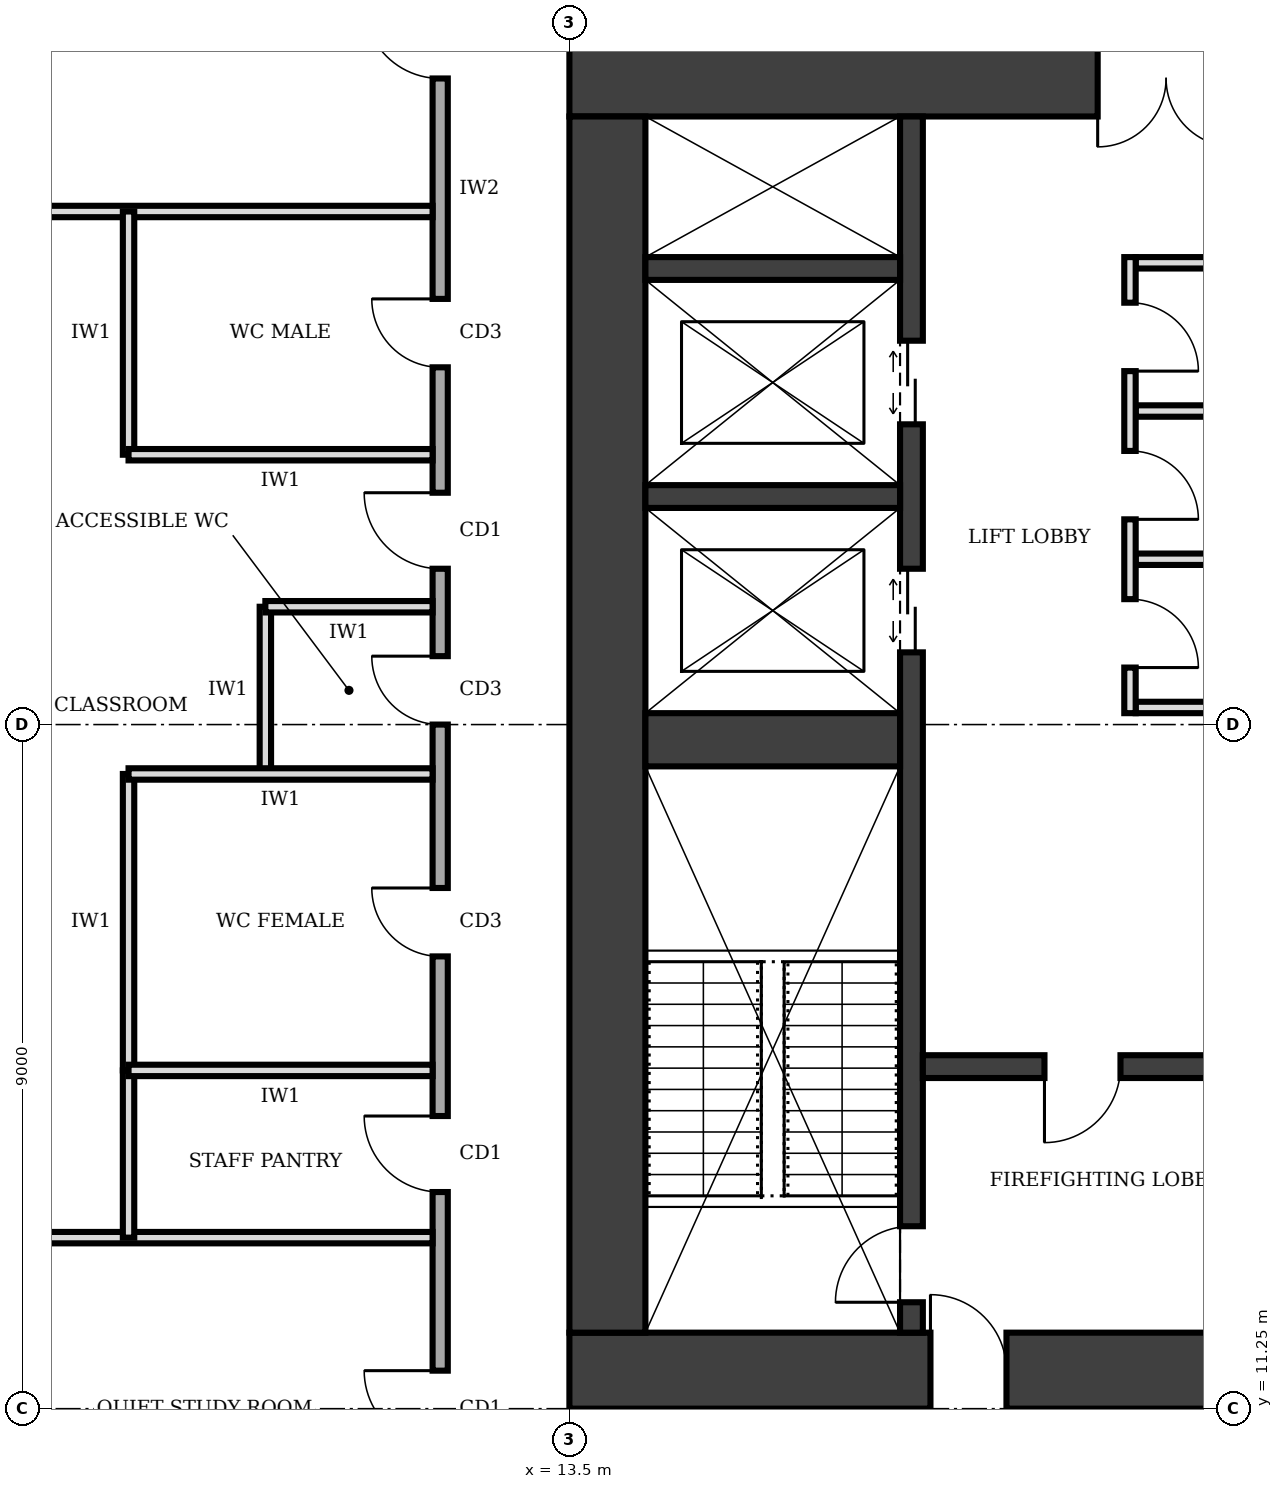
"""IFC4 building model, lengths in metres.
Left out: names, types, materials, properties, quantities, classifications, styles, units other than length and angle.
Written with IfcOpenShell. Run it as: python <this file> out.ifc"""

import sys

from ifc_helpers import new_model, si_unit, direction, frame, frame_2d, origin, place, context, subcontext, project, spatial, rectangle, extrude, element, fill, save


model = new_model("IFC4")
c1 = context("Model", 3, precision=1e-05, world=origin(), true_north=direction((0.0, 1.0)))
c2 = subcontext(c1, "Body", "Model", "MODEL_VIEW")
j1 = project(units=[si_unit("LENGTHUNIT", "METRE"), si_unit("PLANEANGLEUNIT", "RADIAN")], contexts=[c1])
p1 = place(None, origin())
s1 = spatial("IfcSite", under=j1, at=p1, CompositionType="ELEMENT")
p2 = place(p1, origin())
s2 = spatial("IfcBuilding", under=s1, at=p2, CompositionType="ELEMENT")
p3 = place(p2, frame((0.0, 0.0, 61.0)))
s3 = spatial("IfcBuildingStorey", under=s2, at=p3, CompositionType="ELEMENT", Elevation=61.0)
p4 = place(p3, frame((13.5, 11.75, 0.0), z_axis=(0.0, 0.0, 1.0), x_axis=(1.0, 0.0, 0.0)))
e1 = element("IfcWall", 1, at=p4, inside=s3, PredefinedType="SHEAR", context=c2, shape_type="SweptSolid", body=[
    extrude(rectangle(XDim=13.5, YDim=1.0, at=frame_2d((6.75, 0.0))), origin(), (0.0, 0.0, 1.0), 4.0),
])
p5 = place(p4, frame((4.75, 0.0, 0.0)))
e2 = element("IfcOpeningElement", 2, at=p5, cuts=e1, PredefinedType="OPENING", context=c2, shape_type="SweptSolid", body=[
    extrude(rectangle(XDim=1.0, YDim=2.1, at=frame_2d((0.5, 1.05))), frame((0.0, 0.51, 0.0), z_axis=(0.0, -1.0, 0.0), x_axis=(1.0, 0.0, 0.0)), (0.0, 0.0, 1.0), 1.02),
])
p6 = place(p3, frame((27.0, 28.75, 0.0), z_axis=(0.0, 0.0, 1.0), x_axis=(-1.0, 0.0, 0.0)))
e3 = element("IfcWall", 3, at=p6, inside=s3, PredefinedType="SHEAR", context=c2, shape_type="SweptSolid", body=[
    extrude(rectangle(XDim=13.5, YDim=1.0, at=frame_2d((6.75, 0.0))), origin(), (0.0, 0.0, 1.0), 4.0),
])
p7 = place(p6, frame((4.75, 0.0, 0.0)))
e4 = element("IfcOpeningElement", 4, at=p7, cuts=e3, PredefinedType="OPENING", context=c2, shape_type="SweptSolid", body=[
    extrude(rectangle(XDim=1.8, YDim=2.1, at=frame_2d((0.9, 1.05))), frame((0.0, 0.51, 0.0), z_axis=(0.0, -1.0, 0.0), x_axis=(1.0, 0.0, 0.0)), (0.0, 0.0, 1.0), 1.02),
])
p8 = place(p3, frame((14.0, 28.25, 0.0), z_axis=(0.0, 0.0, 1.0), x_axis=(0.0, -1.0, 0.0)))
e5 = element("IfcWall", 5, at=p8, inside=s3, PredefinedType="SHEAR", context=c2, shape_type="SweptSolid", body=[
    extrude(rectangle(XDim=16.0, YDim=1.0, at=frame_2d((8.0, 0.0))), origin(), (0.0, 0.0, 1.0), 4.0),
])
p9 = place(p3, frame((18.0, 12.25, 0.0), z_axis=(0.0, 0.0, 1.0), x_axis=(0.0, 1.0, 0.0)))
e6 = element("IfcWall", 6, at=p9, inside=s3, PredefinedType="SHEAR", context=c2, shape_type="SweptSolid", body=[
    extrude(rectangle(XDim=16.0, YDim=0.3, at=frame_2d((8.0, 0.0))), origin(), (0.0, 0.0, 1.0), 4.0),
])
p10 = place(p9, frame((0.4, 0.0, 0.0)))
e7 = element("IfcOpeningElement", 7, at=p10, cuts=e6, PredefinedType="OPENING", context=c2, shape_type="SweptSolid", body=[
    extrude(rectangle(XDim=1.0, YDim=2.1, at=frame_2d((0.5, 1.05))), frame((0.0, 0.16, 0.0), z_axis=(0.0, -1.0, 0.0), x_axis=(1.0, 0.0, 0.0)), (0.0, 0.0, 1.0), 0.32),
])
p11 = place(p9, frame((8.95, 0.0, 0.0)))
e8 = element("IfcOpeningElement", 8, at=p11, cuts=e6, PredefinedType="OPENING", context=c2, shape_type="SweptSolid", body=[
    extrude(rectangle(XDim=1.1, YDim=2.1, at=frame_2d((0.55, 1.05))), frame((0.0, 0.16, 0.0), z_axis=(0.0, -1.0, 0.0), x_axis=(1.0, 0.0, 0.0)), (0.0, 0.0, 1.0), 0.32),
])
p12 = place(p9, frame((11.95, 0.0, 0.0)))
e9 = element("IfcOpeningElement", 9, at=p12, cuts=e6, PredefinedType="OPENING", context=c2, shape_type="SweptSolid", body=[
    extrude(rectangle(XDim=1.1, YDim=2.1, at=frame_2d((0.55, 1.05))), frame((0.0, 0.16, 0.0), z_axis=(0.0, -1.0, 0.0), x_axis=(1.0, 0.0, 0.0)), (0.0, 0.0, 1.0), 0.32),
])
p13 = place(p3, frame((14.5, 20.05, 0.0), z_axis=(0.0, 0.0, 1.0), x_axis=(1.0, 0.0, 0.0)))
e10 = element("IfcWall", 10, at=p13, inside=s3, PredefinedType="SHEAR", context=c2, shape_type="SweptSolid", body=[
    extrude(rectangle(XDim=3.35, YDim=0.7, at=frame_2d((1.675, 0.0))), origin(), (0.0, 0.0, 1.0), 4.0),
])
p14 = place(p3, frame((18.15, 15.75, 0.0), z_axis=(0.0, 0.0, 1.0), x_axis=(1.0, 0.0, 0.0)))
e11 = element("IfcWall", 11, at=p14, inside=s3, PredefinedType="SHEAR", context=c2, shape_type="SweptSolid", body=[
    extrude(rectangle(XDim=4.2, YDim=0.3, at=frame_2d((2.1, 0.0))), origin(), (0.0, 0.0, 1.0), 4.0),
])
p15 = place(p14, frame((1.6, 0.0, 0.0)))
e12 = element("IfcOpeningElement", 12, at=p15, cuts=e11, PredefinedType="OPENING", context=c2, shape_type="SweptSolid", body=[
    extrude(rectangle(XDim=1.0, YDim=2.1, at=frame_2d((0.5, 1.05))), frame((0.0, 0.16, 0.0), z_axis=(0.0, -1.0, 0.0), x_axis=(1.0, 0.0, 0.0)), (0.0, 0.0, 1.0), 0.32),
])
for number, where, z_axis, x_axis in (
    (13, (14.5, 23.25, 0.0), (0.0, 0.0, 1.0), (1.0, 0.0, 0.0)),
    (14, (14.5, 26.25, 0.0), (0.0, 0.0, 1.0), (1.0, 0.0, 0.0)),
):
    element("IfcWall", number, at=place(p3, frame(where, z_axis=z_axis, x_axis=x_axis)), inside=s3, PredefinedType="SHEAR", context=c2, shape_type="SweptSolid", body=[
        extrude(rectangle(XDim=3.35, YDim=0.3, at=frame_2d((1.675, 0.0))), origin(), (0.0, 0.0, 1.0), 4.0),
    ])
p16 = place(p3, frame((20.875, 20.4, 0.0), z_axis=(0.0, 0.0, 1.0), x_axis=(0.0, 1.0, 0.0)))
e15 = element("IfcWall", 15, at=p16, inside=s3, PredefinedType="PARTITIONING", context=c2, shape_type="SweptSolid", body=[
    extrude(rectangle(XDim=6.0, YDim=0.15, at=frame_2d((3.0, 0.0))), origin(), (0.0, 0.0, 1.0), 3.75),
])
p17 = place(p16, frame((0.6, 0.0, 0.0)))
e16 = element("IfcOpeningElement", 16, at=p17, cuts=e15, PredefinedType="OPENING", context=c2, shape_type="SweptSolid", body=[
    extrude(rectangle(XDim=0.9, YDim=2.1, at=frame_2d((0.45, 1.05))), frame((0.0, 0.085, 0.0), z_axis=(0.0, -1.0, 0.0), x_axis=(1.0, 0.0, 0.0)), (0.0, 0.0, 1.0), 0.17),
])
p18 = place(p16, frame((2.55, 0.0, 0.0)))
e17 = element("IfcOpeningElement", 17, at=p18, cuts=e15, PredefinedType="OPENING", context=c2, shape_type="SweptSolid", body=[
    extrude(rectangle(XDim=0.9, YDim=2.1, at=frame_2d((0.45, 1.05))), frame((0.0, 0.085, 0.0), z_axis=(0.0, -1.0, 0.0), x_axis=(1.0, 0.0, 0.0)), (0.0, 0.0, 1.0), 0.17),
])
p19 = place(p16, frame((4.5, 0.0, 0.0)))
e18 = element("IfcOpeningElement", 18, at=p19, cuts=e15, PredefinedType="OPENING", context=c2, shape_type="SweptSolid", body=[
    extrude(rectangle(XDim=0.9, YDim=2.1, at=frame_2d((0.45, 1.05))), frame((0.0, 0.085, 0.0), z_axis=(0.0, -1.0, 0.0), x_axis=(1.0, 0.0, 0.0)), (0.0, 0.0, 1.0), 0.17),
])
for number, where, z_axis, x_axis in (
    (19, (20.95, 20.475, 0.0), (0.0, 0.0, 1.0), (1.0, 0.0, 0.0)),
    (20, (20.95, 22.425, 0.0), (0.0, 0.0, 1.0), (1.0, 0.0, 0.0)),
    (21, (20.95, 24.375, 0.0), (0.0, 0.0, 1.0), (1.0, 0.0, 0.0)),
    (22, (20.95, 26.325, 0.0), (0.0, 0.0, 1.0), (1.0, 0.0, 0.0)),
):
    element("IfcWall", number, at=place(p3, frame(where, z_axis=z_axis, x_axis=x_axis)), inside=s3, PredefinedType="PARTITIONING", context=c2, shape_type="SweptSolid", body=[
        extrude(rectangle(XDim=1.4, YDim=0.15, at=frame_2d((0.7, 0.0))), origin(), (0.0, 0.0, 1.0), 3.75),
    ])
p20 = place(p3, frame((11.8, 31.3, 0.0), z_axis=(0.0, 0.0, 1.0), x_axis=(0.0, -1.0, 0.0)))
e23 = element("IfcWall", 23, at=p20, inside=s3, PredefinedType="SOLIDWALL", context=c2, shape_type="SweptSolid", body=[
    extrude(rectangle(XDim=22.3, YDim=0.2, at=frame_2d((11.15, 0.0))), origin(), (0.0, 0.0, 1.0), 3.75),
])
p21 = place(p20, frame((19.55, 0.0, 0.0)))
e24 = element("IfcOpeningElement", 24, at=p21, cuts=e23, PredefinedType="OPENING", context=c2, shape_type="SweptSolid", body=[
    extrude(rectangle(XDim=1.0, YDim=2.1, at=frame_2d((0.5, 1.05))), frame((0.0, 0.11, 0.0), z_axis=(0.0, -1.0, 0.0), x_axis=(1.0, 0.0, 0.0)), (0.0, 0.0, 1.0), 0.22),
])
p22 = place(p20, frame((16.2, 0.0, 0.0)))
e25 = element("IfcOpeningElement", 25, at=p22, cuts=e23, PredefinedType="OPENING", context=c2, shape_type="SweptSolid", body=[
    extrude(rectangle(XDim=1.0, YDim=2.1, at=frame_2d((0.5, 1.05))), frame((0.0, 0.11, 0.0), z_axis=(0.0, -1.0, 0.0), x_axis=(1.0, 0.0, 0.0)), (0.0, 0.0, 1.0), 0.22),
])
p23 = place(p20, frame((13.2, 0.0, 0.0)))
e26 = element("IfcOpeningElement", 26, at=p23, cuts=e23, PredefinedType="OPENING", context=c2, shape_type="SweptSolid", body=[
    extrude(rectangle(XDim=0.9, YDim=2.1, at=frame_2d((0.45, 1.05))), frame((0.0, 0.11, 0.0), z_axis=(0.0, -1.0, 0.0), x_axis=(1.0, 0.0, 0.0)), (0.0, 0.0, 1.0), 0.22),
])
p24 = place(p20, frame((10.15, 0.0, 0.0)))
e27 = element("IfcOpeningElement", 27, at=p24, cuts=e23, PredefinedType="OPENING", context=c2, shape_type="SweptSolid", body=[
    extrude(rectangle(XDim=0.9, YDim=2.1, at=frame_2d((0.45, 1.05))), frame((0.0, 0.11, 0.0), z_axis=(0.0, -1.0, 0.0), x_axis=(1.0, 0.0, 0.0)), (0.0, 0.0, 1.0), 0.22),
])
p25 = place(p20, frame((5.45, 0.0, 0.0)))
e28 = element("IfcOpeningElement", 28, at=p25, cuts=e23, PredefinedType="OPENING", context=c2, shape_type="SweptSolid", body=[
    extrude(rectangle(XDim=0.9, YDim=2.1, at=frame_2d((0.45, 1.05))), frame((0.0, 0.11, 0.0), z_axis=(0.0, -1.0, 0.0), x_axis=(1.0, 0.0, 0.0)), (0.0, 0.0, 1.0), 0.22),
])
p26 = place(p20, frame((8.0, 0.0, 0.0)))
e29 = element("IfcOpeningElement", 29, at=p26, cuts=e23, PredefinedType="OPENING", context=c2, shape_type="SweptSolid", body=[
    extrude(rectangle(XDim=1.0, YDim=2.1, at=frame_2d((0.5, 1.05))), frame((0.0, 0.11, 0.0), z_axis=(0.0, -1.0, 0.0), x_axis=(1.0, 0.0, 0.0)), (0.0, 0.0, 1.0), 0.22),
])
p27 = place(p20, frame((1.55, 0.0, 0.0)))
e30 = element("IfcOpeningElement", 30, at=p27, cuts=e23, PredefinedType="OPENING", context=c2, shape_type="SweptSolid", body=[
    extrude(rectangle(XDim=1.0, YDim=2.1, at=frame_2d((0.5, 1.05))), frame((0.0, 0.11, 0.0), z_axis=(0.0, -1.0, 0.0), x_axis=(1.0, 0.0, 0.0)), (0.0, 0.0, 1.0), 0.22),
])
for number, where, z_axis, x_axis in (
    (31, (0.3, 13.5, 0.0), (0.0, 0.0, 1.0), (1.0, 0.0, 0.0)),
    (32, (0.3, 27.0, 0.0), (0.0, 0.0, 1.0), (1.0, 0.0, 0.0)),
):
    element("IfcWall", number, at=place(p3, frame(where, z_axis=z_axis, x_axis=x_axis)), inside=s3, PredefinedType="PARTITIONING", context=c2, shape_type="SweptSolid", body=[
        extrude(rectangle(XDim=11.4, YDim=0.15, at=frame_2d((5.7, 0.0))), origin(), (0.0, 0.0, 1.0), 3.75),
    ])
p28 = place(p3, frame((11.7, 15.7, 0.0), z_axis=(0.0, 0.0, 1.0), x_axis=(-1.0, 0.0, 0.0)))
e33 = element("IfcWall", 33, at=p28, inside=s3, PredefinedType="PARTITIONING", context=c2, shape_type="SweptSolid", body=[
    extrude(rectangle(XDim=4.0, YDim=0.15, at=frame_2d((2.0, 0.0))), origin(), (0.0, 0.0, 1.0), 3.75),
])
p29 = place(p3, frame((11.7, 19.6, 0.0), z_axis=(0.0, 0.0, 1.0), x_axis=(-1.0, 0.0, 0.0)))
e34 = element("IfcWall", 34, at=p29, inside=s3, PredefinedType="PARTITIONING", context=c2, shape_type="SweptSolid", body=[
    extrude(rectangle(XDim=4.0, YDim=0.15, at=frame_2d((2.0, 0.0))), origin(), (0.0, 0.0, 1.0), 2.85),
])
p30 = place(p3, frame((11.7, 21.8, 0.0), z_axis=(0.0, 0.0, 1.0), x_axis=(-1.0, 0.0, 0.0)))
e35 = element("IfcWall", 35, at=p30, inside=s3, PredefinedType="PARTITIONING", context=c2, shape_type="SweptSolid", body=[
    extrude(rectangle(XDim=2.2, YDim=0.15, at=frame_2d((1.1, 0.0))), origin(), (0.0, 0.0, 1.0), 3.75),
])
p31 = place(p3, frame((11.7, 23.8, 0.0), z_axis=(0.0, 0.0, 1.0), x_axis=(-1.0, 0.0, 0.0)))
e36 = element("IfcWall", 36, at=p31, inside=s3, PredefinedType="PARTITIONING", context=c2, shape_type="SweptSolid", body=[
    extrude(rectangle(XDim=4.0, YDim=0.15, at=frame_2d((2.0, 0.0))), origin(), (0.0, 0.0, 1.0), 3.75),
])
p32 = place(p3, frame((7.7, 13.5, 0.0), z_axis=(0.0, 0.0, 1.0), x_axis=(0.0, 1.0, 0.0)))
e37 = element("IfcWall", 37, at=p32, inside=s3, PredefinedType="PARTITIONING", context=c2, shape_type="SweptSolid", body=[
    extrude(rectangle(XDim=2.2, YDim=0.15, at=frame_2d((1.1, 0.0))), origin(), (0.0, 0.0, 1.0), 3.75),
])
p33 = place(p3, frame((7.7, 15.7, 0.0), z_axis=(0.0, 0.0, 1.0), x_axis=(0.0, 1.0, 0.0)))
e38 = element("IfcWall", 38, at=p33, inside=s3, PredefinedType="PARTITIONING", context=c2, shape_type="SweptSolid", body=[
    extrude(rectangle(XDim=3.9, YDim=0.15, at=frame_2d((1.95, 0.0))), origin(), (0.0, 0.0, 1.0), 3.75),
])
p34 = place(p3, frame((9.5, 19.6, 0.0), z_axis=(0.0, 0.0, 1.0), x_axis=(0.0, 1.0, 0.0)))
e39 = element("IfcWall", 39, at=p34, inside=s3, PredefinedType="PARTITIONING", context=c2, shape_type="SweptSolid", body=[
    extrude(rectangle(XDim=2.2, YDim=0.15, at=frame_2d((1.1, 0.0))), origin(), (0.0, 0.0, 1.0), 3.75),
])
p35 = place(p3, frame((7.7, 23.8, 0.0), z_axis=(0.0, 0.0, 1.0), x_axis=(0.0, 1.0, 0.0)))
e40 = element("IfcWall", 40, at=p35, inside=s3, PredefinedType="PARTITIONING", context=c2, shape_type="SweptSolid", body=[
    extrude(rectangle(XDim=3.2, YDim=0.15, at=frame_2d((1.6, 0.0))), origin(), (0.0, 0.0, 1.0), 3.75),
])
p36 = place(p5, origin())
e41 = element("IfcDoor", 41, at=p36, inside=s3, OperationType="SINGLE_SWING_LEFT", PredefinedType="DOOR", context=c2, shape_type="SweptSolid", body=[
    extrude(rectangle(XDim=1.0, YDim=2.1, at=frame_2d((0.5, 1.05))), frame((0.0, 0.025, 0.0), z_axis=(0.0, -1.0, 0.0), x_axis=(1.0, 0.0, 0.0)), (0.0, 0.0, 1.0), 0.05),
])
fill(e2, e41)
p37 = place(p7, origin())
e42 = element("IfcDoor", 42, at=p37, inside=s3, OperationType="DOUBLE_DOOR_SINGLE_SWING", PredefinedType="DOOR", context=c2, shape_type="SweptSolid", body=[
    extrude(rectangle(XDim=1.8, YDim=2.1, at=frame_2d((0.9, 1.05))), frame((0.0, 0.025, 0.0), z_axis=(0.0, -1.0, 0.0), x_axis=(1.0, 0.0, 0.0)), (0.0, 0.0, 1.0), 0.05),
])
fill(e4, e42)
p38 = place(p15, frame((1.0, 0.0, 0.0), z_axis=(0.0, 0.0, 1.0), x_axis=(-1.0, 0.0, 0.0)))
e43 = element("IfcDoor", 43, at=p38, inside=s3, OperationType="SINGLE_SWING_RIGHT", PredefinedType="DOOR", context=c2, shape_type="SweptSolid", body=[
    extrude(rectangle(XDim=1.0, YDim=2.1, at=frame_2d((0.5, 1.05))), frame((0.0, 0.025, 0.0), z_axis=(0.0, -1.0, 0.0), x_axis=(1.0, 0.0, 0.0)), (0.0, 0.0, 1.0), 0.05),
])
fill(e12, e43)
p39 = place(p10, origin())
e44 = element("IfcDoor", 44, at=p39, inside=s3, OperationType="SINGLE_SWING_LEFT", PredefinedType="DOOR", context=c2, shape_type="SweptSolid", body=[
    extrude(rectangle(XDim=1.0, YDim=2.1, at=frame_2d((0.5, 1.05))), frame((0.0, 0.025, 0.0), z_axis=(0.0, -1.0, 0.0), x_axis=(1.0, 0.0, 0.0)), (0.0, 0.0, 1.0), 0.05),
])
fill(e7, e44)
p40 = place(p11, origin())
e45 = element("IfcDoor", 45, at=p40, inside=s3, OperationType="DOUBLE_DOOR_SLIDING", PredefinedType="DOOR", context=c2, shape_type="SweptSolid", body=[
    extrude(rectangle(XDim=1.1, YDim=2.1, at=frame_2d((0.55, 1.05))), frame((0.0, 0.025, 0.0), z_axis=(0.0, -1.0, 0.0), x_axis=(1.0, 0.0, 0.0)), (0.0, 0.0, 1.0), 0.05),
])
fill(e8, e45)
p41 = place(p12, origin())
e46 = element("IfcDoor", 46, at=p41, inside=s3, OperationType="DOUBLE_DOOR_SLIDING", PredefinedType="DOOR", context=c2, shape_type="SweptSolid", body=[
    extrude(rectangle(XDim=1.1, YDim=2.1, at=frame_2d((0.55, 1.05))), frame((0.0, 0.025, 0.0), z_axis=(0.0, -1.0, 0.0), x_axis=(1.0, 0.0, 0.0)), (0.0, 0.0, 1.0), 0.05),
])
fill(e9, e46)
p42 = place(p17, frame((0.9, 0.0, 0.0), z_axis=(0.0, 0.0, 1.0), x_axis=(-1.0, 0.0, 0.0)))
e47 = element("IfcDoor", 47, at=p42, inside=s3, OperationType="SINGLE_SWING_RIGHT", PredefinedType="DOOR", context=c2, shape_type="SweptSolid", body=[
    extrude(rectangle(XDim=0.9, YDim=2.1, at=frame_2d((0.45, 1.05))), frame((0.0, 0.025, 0.0), z_axis=(0.0, -1.0, 0.0), x_axis=(1.0, 0.0, 0.0)), (0.0, 0.0, 1.0), 0.05),
])
fill(e16, e47)
p43 = place(p18, frame((0.9, 0.0, 0.0), z_axis=(0.0, 0.0, 1.0), x_axis=(-1.0, 0.0, 0.0)))
e48 = element("IfcDoor", 48, at=p43, inside=s3, OperationType="SINGLE_SWING_RIGHT", PredefinedType="DOOR", context=c2, shape_type="SweptSolid", body=[
    extrude(rectangle(XDim=0.9, YDim=2.1, at=frame_2d((0.45, 1.05))), frame((0.0, 0.025, 0.0), z_axis=(0.0, -1.0, 0.0), x_axis=(1.0, 0.0, 0.0)), (0.0, 0.0, 1.0), 0.05),
])
fill(e17, e48)
p44 = place(p19, frame((0.9, 0.0, 0.0), z_axis=(0.0, 0.0, 1.0), x_axis=(-1.0, 0.0, 0.0)))
e49 = element("IfcDoor", 49, at=p44, inside=s3, OperationType="SINGLE_SWING_RIGHT", PredefinedType="DOOR", context=c2, shape_type="SweptSolid", body=[
    extrude(rectangle(XDim=0.9, YDim=2.1, at=frame_2d((0.45, 1.05))), frame((0.0, 0.025, 0.0), z_axis=(0.0, -1.0, 0.0), x_axis=(1.0, 0.0, 0.0)), (0.0, 0.0, 1.0), 0.05),
])
fill(e18, e49)
p45 = place(p21, frame((1.0, 0.0, 0.0), z_axis=(0.0, 0.0, 1.0), x_axis=(-1.0, 0.0, 0.0)))
e50 = element("IfcDoor", 50, at=p45, inside=s3, OperationType="SINGLE_SWING_RIGHT", PredefinedType="DOOR", context=c2, shape_type="SweptSolid", body=[
    extrude(rectangle(XDim=1.0, YDim=2.1, at=frame_2d((0.5, 1.05))), frame((0.0, 0.025, 0.0), z_axis=(0.0, -1.0, 0.0), x_axis=(1.0, 0.0, 0.0)), (0.0, 0.0, 1.0), 0.05),
])
fill(e24, e50)
p46 = place(p22, frame((1.0, 0.0, 0.0), z_axis=(0.0, 0.0, 1.0), x_axis=(-1.0, 0.0, 0.0)))
e51 = element("IfcDoor", 51, at=p46, inside=s3, OperationType="SINGLE_SWING_RIGHT", PredefinedType="DOOR", context=c2, shape_type="SweptSolid", body=[
    extrude(rectangle(XDim=1.0, YDim=2.1, at=frame_2d((0.5, 1.05))), frame((0.0, 0.025, 0.0), z_axis=(0.0, -1.0, 0.0), x_axis=(1.0, 0.0, 0.0)), (0.0, 0.0, 1.0), 0.05),
])
fill(e25, e51)
p47 = place(p23, frame((0.9, 0.0, 0.0), z_axis=(0.0, 0.0, 1.0), x_axis=(-1.0, 0.0, 0.0)))
e52 = element("IfcDoor", 52, at=p47, inside=s3, OperationType="SINGLE_SWING_RIGHT", PredefinedType="DOOR", context=c2, shape_type="SweptSolid", body=[
    extrude(rectangle(XDim=0.9, YDim=2.1, at=frame_2d((0.45, 1.05))), frame((0.0, 0.025, 0.0), z_axis=(0.0, -1.0, 0.0), x_axis=(1.0, 0.0, 0.0)), (0.0, 0.0, 1.0), 0.05),
])
fill(e26, e52)
p48 = place(p24, frame((0.9, 0.0, 0.0), z_axis=(0.0, 0.0, 1.0), x_axis=(-1.0, 0.0, 0.0)))
e53 = element("IfcDoor", 53, at=p48, inside=s3, OperationType="SINGLE_SWING_RIGHT", PredefinedType="DOOR", context=c2, shape_type="SweptSolid", body=[
    extrude(rectangle(XDim=0.9, YDim=2.1, at=frame_2d((0.45, 1.05))), frame((0.0, 0.025, 0.0), z_axis=(0.0, -1.0, 0.0), x_axis=(1.0, 0.0, 0.0)), (0.0, 0.0, 1.0), 0.05),
])
fill(e27, e53)
p49 = place(p25, frame((0.9, 0.0, 0.0), z_axis=(0.0, 0.0, 1.0), x_axis=(-1.0, 0.0, 0.0)))
e54 = element("IfcDoor", 54, at=p49, inside=s3, OperationType="SINGLE_SWING_RIGHT", PredefinedType="DOOR", context=c2, shape_type="SweptSolid", body=[
    extrude(rectangle(XDim=0.9, YDim=2.1, at=frame_2d((0.45, 1.05))), frame((0.0, 0.025, 0.0), z_axis=(0.0, -1.0, 0.0), x_axis=(1.0, 0.0, 0.0)), (0.0, 0.0, 1.0), 0.05),
])
fill(e28, e54)
p50 = place(p26, frame((1.0, 0.0, 0.0), z_axis=(0.0, 0.0, 1.0), x_axis=(-1.0, 0.0, 0.0)))
e55 = element("IfcDoor", 55, at=p50, inside=s3, OperationType="SINGLE_SWING_RIGHT", PredefinedType="DOOR", context=c2, shape_type="SweptSolid", body=[
    extrude(rectangle(XDim=1.0, YDim=2.1, at=frame_2d((0.5, 1.05))), frame((0.0, 0.025, 0.0), z_axis=(0.0, -1.0, 0.0), x_axis=(1.0, 0.0, 0.0)), (0.0, 0.0, 1.0), 0.05),
])
fill(e29, e55)
p51 = place(p27, frame((1.0, 0.0, 0.0), z_axis=(0.0, 0.0, 1.0), x_axis=(-1.0, 0.0, 0.0)))
e56 = element("IfcDoor", 56, at=p51, inside=s3, OperationType="SINGLE_SWING_RIGHT", PredefinedType="DOOR", context=c2, shape_type="SweptSolid", body=[
    extrude(rectangle(XDim=1.0, YDim=2.1, at=frame_2d((0.5, 1.05))), frame((0.0, 0.025, 0.0), z_axis=(0.0, -1.0, 0.0), x_axis=(1.0, 0.0, 0.0)), (0.0, 0.0, 1.0), 0.05),
])
fill(e30, e56)
save(model, sys.argv[1])
